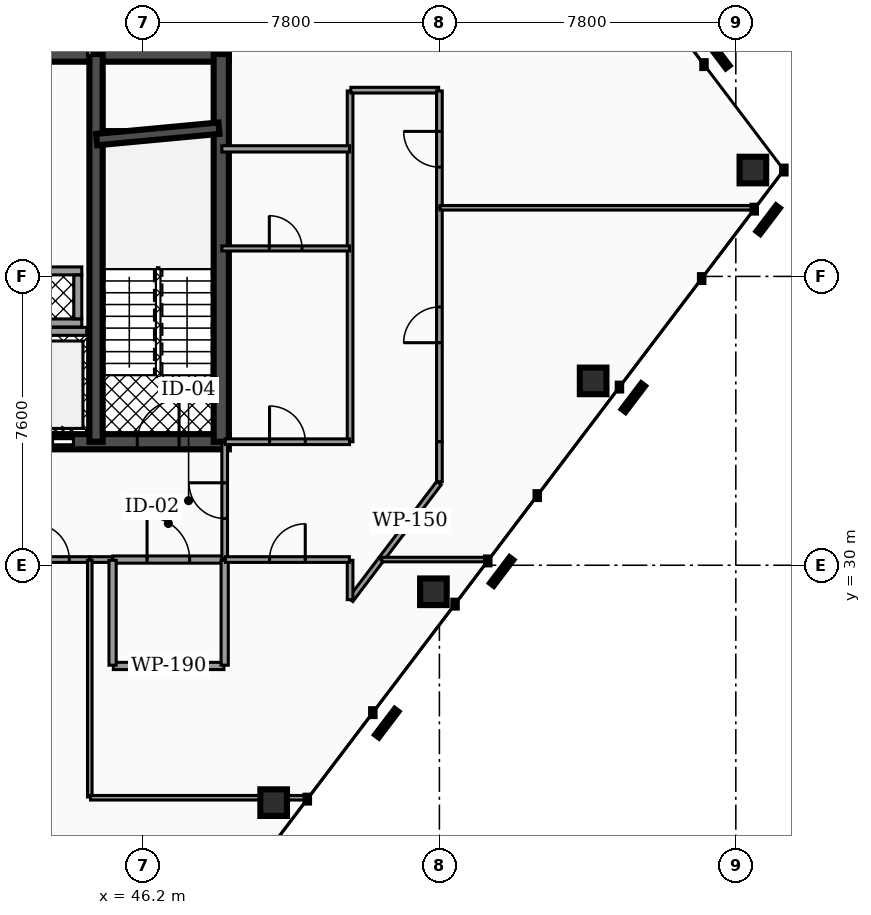
"""IFC4 building model, lengths in metres.
Left out: names, types, materials, properties, quantities, classifications, styles, units other than length and angle.
Written with IfcOpenShell. Run it as: python <this file> out.ifc"""

import sys

from ifc_helpers import new_model, si_unit, direction, frame, frame_2d, origin, origin_2d, place, context, subcontext, project, spatial, rectangle, hollow_rectangle, extrude, element, fill, save


model = new_model("IFC4")
c1 = context("Model", 3, precision=1e-05, world=origin(), true_north=direction((0.0, 1.0)))
c2 = subcontext(c1, "Body", "Model", "MODEL_VIEW")
j1 = project(units=[si_unit("LENGTHUNIT", "METRE"), si_unit("PLANEANGLEUNIT", "RADIAN")], contexts=[c1])
p1 = place(None, origin())
s1 = spatial("IfcSite", under=j1, at=p1, CompositionType="ELEMENT")
p2 = place(p1, origin())
s2 = spatial("IfcBuilding", under=s1, at=p2, CompositionType="ELEMENT")
p3 = place(p2, frame((0.0, 0.0, 175.78)))
s3 = spatial("IfcBuildingStorey", under=s2, at=p3, CompositionType="ELEMENT", Elevation=175.78)
p4 = place(p3, frame((28.4, 43.45, 0.0), z_axis=(0.0, 0.0, 1.0), x_axis=(1.0, 0.0, 0.0)))
e1 = element("IfcWall", 1, at=p4, inside=s3, PredefinedType="SHEAR", context=c2, shape_type="SweptSolid", body=[
    extrude(rectangle(XDim=20.06, YDim=0.4, at=frame_2d((10.03, 0.0))), origin(), (0.0, 0.0, 1.0), 3.5),
])
p5 = place(p3, frame((28.4, 33.25, 0.0), z_axis=(0.0, 0.0, 1.0), x_axis=(1.0, 0.0, 0.0)))
e2 = element("IfcWall", 2, at=p5, inside=s3, PredefinedType="SHEAR", context=c2, shape_type="SweptSolid", body=[
    extrude(rectangle(XDim=20.06, YDim=0.4, at=frame_2d((10.03, 0.0))), origin(), (0.0, 0.0, 1.0), 3.5),
])
p6 = place(p5, frame((4.03, 0.0, 0.0)))
e3 = element("IfcOpeningElement", 3, at=p6, cuts=e2, PredefinedType="OPENING", context=c2, shape_type="SweptSolid", body=[
    extrude(rectangle(XDim=1.1, YDim=2.15, at=frame_2d((0.55, 1.075))), frame((0.0, 0.21, 0.0), z_axis=(0.0, -1.0, 0.0), x_axis=(1.0, 0.0, 0.0)), (0.0, 0.0, 1.0), 0.42),
])
p7 = place(p5, frame((14.87, 0.0, 0.0)))
e4 = element("IfcOpeningElement", 4, at=p7, cuts=e2, PredefinedType="OPENING", context=c2, shape_type="SweptSolid", body=[
    extrude(rectangle(XDim=1.1, YDim=2.15, at=frame_2d((0.55, 1.075))), frame((0.0, 0.21, 0.0), z_axis=(0.0, -1.0, 0.0), x_axis=(1.0, 0.0, 0.0)), (0.0, 0.0, 1.0), 0.42),
])
p8 = place(p5, frame((5.95, 0.0, 0.0)))
e5 = element("IfcOpeningElement", 5, at=p8, cuts=e2, PredefinedType="OPENING", context=c2, shape_type="SweptSolid", body=[
    extrude(rectangle(XDim=1.0, YDim=2.1, at=frame_2d((0.5, 1.05))), frame((0.0, 0.21, 0.0), z_axis=(0.0, -1.0, 0.0), x_axis=(1.0, 0.0, 0.0)), (0.0, 0.0, 1.0), 0.42),
])
p9 = place(p5, frame((7.65, 0.0, 0.0)))
e6 = element("IfcOpeningElement", 6, at=p9, cuts=e2, PredefinedType="OPENING", context=c2, shape_type="SweptSolid", body=[
    extrude(rectangle(XDim=1.0, YDim=2.1, at=frame_2d((0.5, 1.05))), frame((0.0, 0.21, 0.0), z_axis=(0.0, -1.0, 0.0), x_axis=(1.0, 0.0, 0.0)), (0.0, 0.0, 1.0), 0.42),
])
p10 = place(p5, frame((1.31, 0.0, 0.0)))
e7 = element("IfcOpeningElement", 7, at=p10, cuts=e2, PredefinedType="OPENING", context=c2, shape_type="SweptSolid", body=[
    extrude(rectangle(XDim=1.1, YDim=2.2, at=frame_2d((0.55, 1.1))), frame((0.0, 0.21, 0.0), z_axis=(0.0, -1.0, 0.0), x_axis=(1.0, 0.0, 0.0)), (0.0, 0.0, 1.0), 0.42),
])
p11 = place(p5, frame((9.44, 0.0, 0.0)))
e8 = element("IfcOpeningElement", 8, at=p11, cuts=e2, PredefinedType="OPENING", context=c2, shape_type="SweptSolid", body=[
    extrude(rectangle(XDim=1.12, YDim=2.05, at=frame_2d((0.56, 1.025))), frame((0.0, 0.21, 0.0), z_axis=(0.0, -1.0, 0.0), x_axis=(1.0, 0.0, 0.0)), (0.0, 0.0, 1.0), 0.42),
])
p12 = place(p5, frame((17.65, 0.0, 0.0)))
e9 = element("IfcOpeningElement", 9, at=p12, cuts=e2, PredefinedType="OPENING", context=c2, shape_type="SweptSolid", body=[
    extrude(rectangle(XDim=1.1, YDim=2.2, at=frame_2d((0.55, 1.1))), frame((0.0, 0.21, 0.0), z_axis=(0.0, -1.0, 0.0), x_axis=(1.0, 0.0, 0.0)), (0.0, 0.0, 1.0), 0.42),
])
p13 = place(p3, frame((44.965, 33.25, 0.0), z_axis=(0.0, 0.0, 1.0), x_axis=(0.0, 1.0, 0.0)))
e10 = element("IfcWall", 10, at=p13, inside=s3, PredefinedType="SHEAR", context=c2, shape_type="SweptSolid", body=[
    extrude(rectangle(XDim=10.2, YDim=0.35, at=frame_2d((5.1, 0.0))), origin(), (0.0, 0.0, 1.0), 3.5),
])
p14 = place(p3, frame((48.26, 33.25, 0.0), z_axis=(0.0, 0.0, 1.0), x_axis=(0.0, 1.0, 0.0)))
e11 = element("IfcWall", 11, at=p14, inside=s3, PredefinedType="SHEAR", context=c2, shape_type="SweptSolid", body=[
    extrude(rectangle(XDim=10.2, YDim=0.4, at=frame_2d((5.1, 0.0))), origin(), (0.0, 0.0, 1.0), 3.5),
])
p15 = place(p3, frame((44.98, 41.2, 0.0), z_axis=(0.0, 0.0, 1.0), x_axis=(0.995686468965, 0.09278176286, 0.0)))
e12 = element("IfcWall", 12, at=p15, inside=s3, PredefinedType="SHEAR", context=c2, shape_type="SweptSolid", body=[
    extrude(rectangle(XDim=3.234, YDim=0.3, at=frame_2d((1.617, 0.0))), origin(), (0.0, 0.0, 1.0), 3.5),
])
for number, where, z_axis, x_axis in (
    (13, (49.639, 23.754, 0.0), (0.0, 0.0, 1.0), (1.0, 0.0, 0.0)),
    (14, (53.842, 29.302, 0.0), (0.0, 0.0, 1.0), (1.0, 0.0, 0.0)),
    (15, (58.045, 34.851, 0.0), (0.0, 0.0, 1.0), (1.0, 0.0, 0.0)),
    (16, (62.249, 40.399, 0.0), (0.0, 0.0, 1.0), (1.0, 0.0, 0.0)),
):
    element("IfcColumn", number, at=place(p3, frame(where, z_axis=z_axis, x_axis=x_axis)), inside=s3, PredefinedType="COLUMN", context=c2, shape_type="SweptSolid", body=[
        extrude(hollow_rectangle(XDim=0.7, YDim=0.7, WallThickness=0.035, at=origin_2d()), origin(), (0.0, 0.0, 1.0), 3.5),
    ])
p16 = place(p3, frame((42.92, 36.155, 0.0), z_axis=(0.0, 0.0, 1.0), x_axis=(1.0, 0.0, 0.0)))
e17 = element("IfcWall", 17, at=p16, inside=s3, PredefinedType="SOLIDWALL", context=c2, shape_type="SweptSolid", body=[
    extrude(rectangle(XDim=1.8, YDim=0.21, at=frame_2d((0.9, 0.0))), origin(), (0.0, 0.0, 1.0), 2.472),
])
for number, where, z_axis, x_axis in (
    (18, (42.99, 36.375, 0.0), (0.0, 0.0, 1.0), (1.0, 0.0, 0.0)),
    (19, (42.99, 37.745, 0.0), (0.0, 0.0, 1.0), (1.0, 0.0, 0.0)),
):
    element("IfcWall", number, at=place(p3, frame(where, z_axis=z_axis, x_axis=x_axis)), inside=s3, PredefinedType="SOLIDWALL", context=c2, shape_type="SweptSolid", body=[
        extrude(rectangle(XDim=1.6, YDim=0.21, at=frame_2d((0.8, 0.0))), origin(), (0.0, 0.0, 1.0), 3.5),
    ])
p17 = place(p3, frame((44.485, 36.485, 0.0), z_axis=(0.0, 0.0, 1.0), x_axis=(0.0, 1.0, 0.0)))
e20 = element("IfcWall", 20, at=p17, inside=s3, PredefinedType="SOLIDWALL", context=c2, shape_type="SweptSolid", body=[
    extrude(rectangle(XDim=1.15, YDim=0.21, at=frame_2d((0.575, 0.0))), origin(), (0.0, 0.0, 1.0), 3.5),
])
p18 = place(p3, frame((45.405, 30.15, 0.0), z_axis=(0.0, 0.0, 1.0), x_axis=(1.0, 0.0, 0.0)))
e21 = element("IfcWall", 21, at=p18, inside=s3, PredefinedType="PARTITIONING", context=c2, shape_type="SweptSolid", body=[
    extrude(rectangle(XDim=2.925, YDim=0.19, at=frame_2d((1.462, 0.0))), origin(), (0.0, 0.0, 1.0), 2.457),
])
p19 = place(p18, frame((0.903, 0.0, 0.0)))
e22 = element("IfcOpeningElement", 22, at=p19, cuts=e21, PredefinedType="OPENING", context=c2, shape_type="SweptSolid", body=[
    extrude(rectangle(XDim=1.12, YDim=2.05, at=frame_2d((0.56, 1.025))), frame((0.0, 0.105, 0.0), z_axis=(0.0, -1.0, 0.0), x_axis=(1.0, 0.0, 0.0)), (0.0, 0.0, 1.0), 0.21),
])
p20 = place(p3, frame((48.35, 30.17, 0.0), z_axis=(0.0, 0.0, 1.0), x_axis=(0.0, 1.0, 0.0)))
e23 = element("IfcWall", 23, at=p20, inside=s3, PredefinedType="PARTITIONING", context=c2, shape_type="SweptSolid", body=[
    extrude(rectangle(XDim=3.06, YDim=0.15, at=frame_2d((1.53, 0.0))), origin(), (0.0, 0.0, 1.0), 2.457),
])
p21 = place(p20, frame((1.06, 0.0, 0.0)))
e24 = element("IfcOpeningElement", 24, at=p21, cuts=e23, PredefinedType="OPENING", context=c2, shape_type="SweptSolid", body=[
    extrude(rectangle(XDim=0.94, YDim=2.05, at=frame_2d((0.47, 1.025))), frame((0.0, 0.085, 0.0), z_axis=(0.0, -1.0, 0.0), x_axis=(1.0, 0.0, 0.0)), (0.0, 0.0, 1.0), 0.17),
])
p22 = place(p3, frame((35.985, 30.15, 0.0), z_axis=(0.0, 0.0, 1.0), x_axis=(1.0, 0.0, 0.0)))
e25 = element("IfcWall", 25, at=p22, inside=s3, PredefinedType="PARTITIONING", context=c2, shape_type="SweptSolid", body=[
    extrude(rectangle(XDim=8.81, YDim=0.15, at=frame_2d((4.405, 0.0))), origin(), (0.0, 0.0, 1.0), 2.457),
])
p23 = place(p22, frame((7.335, 0.0, 0.0)))
e26 = element("IfcOpeningElement", 26, at=p23, cuts=e25, PredefinedType="OPENING", context=c2, shape_type="SweptSolid", body=[
    extrude(rectangle(XDim=0.94, YDim=2.05, at=frame_2d((0.47, 1.025))), frame((0.0, 0.085, 0.0), z_axis=(0.0, -1.0, 0.0), x_axis=(1.0, 0.0, 0.0)), (0.0, 0.0, 1.0), 0.17),
])
p24 = place(p3, frame((44.805, 30.15, 0.0), z_axis=(0.0, 0.0, 1.0), x_axis=(1.0, 0.0, 0.0)))
e27 = element("IfcWall", 27, at=p24, inside=s3, PredefinedType="PARTITIONING", context=c2, shape_type="SweptSolid", body=[
    extrude(rectangle(XDim=0.59, YDim=0.15, at=frame_2d((0.295, 0.0))), origin(), (0.0, 0.0, 1.0), 2.457),
])
p25 = place(p3, frame((45.42, 27.35, 0.0), z_axis=(0.0, 0.0, 1.0), x_axis=(1.0, 0.0, 0.0)))
e28 = element("IfcWall", 28, at=p25, inside=s3, PredefinedType="PARTITIONING", context=c2, shape_type="SweptSolid", body=[
    extrude(rectangle(XDim=2.91, YDim=0.19, at=frame_2d((1.455, 0.0))), origin(), (0.0, 0.0, 1.0), 2.457),
])
for number, where, z_axis, x_axis in (
    (29, (45.4, 27.37, 0.0), (0.0, 0.0, 1.0), (0.0, 1.0, 0.0)),
    (30, (48.35, 27.37, 0.0), (0.0, 0.0, 1.0), (0.0, 1.0, 0.0)),
):
    element("IfcWall", number, at=place(p3, frame(where, z_axis=z_axis, x_axis=x_axis)), inside=s3, PredefinedType="PARTITIONING", context=c2, shape_type="SweptSolid", body=[
        extrude(rectangle(XDim=2.76, YDim=0.19, at=frame_2d((1.38, 0.0))), origin(), (0.0, 0.0, 1.0), 2.457),
    ])
p26 = place(p3, frame((51.662, 29.091, 0.0), z_axis=(0.0, 0.0, 1.0), x_axis=(0.603847067363, 0.797100193976, 0.0)))
e31 = element("IfcWall", 31, at=p26, inside=s3, PredefinedType="PARTITIONING", context=c2, shape_type="SweptSolid", body=[
    extrude(rectangle(XDim=1.328, YDim=0.15, at=frame_2d((0.664, 0.0))), origin(), (0.0, 0.0, 1.0), 2.457),
])
p27 = place(p3, frame((51.65, 29.095, 0.0), z_axis=(0.0, 0.0, 1.0), x_axis=(0.0, 1.0, 0.0)))
e32 = element("IfcWall", 32, at=p27, inside=s3, PredefinedType="PARTITIONING", context=c2, shape_type="SweptSolid", body=[
    extrude(rectangle(XDim=1.035, YDim=0.15, at=frame_2d((0.518, 0.0))), origin(), (0.0, 0.0, 1.0), 2.457),
])
p28 = place(p3, frame((48.37, 30.15, 0.0), z_axis=(0.0, 0.0, 1.0), x_axis=(1.0, 0.0, 0.0)))
e33 = element("IfcWall", 33, at=p28, inside=s3, PredefinedType="PARTITIONING", context=c2, shape_type="SweptSolid", body=[
    extrude(rectangle(XDim=3.26, YDim=0.15, at=frame_2d((1.63, 0.0))), origin(), (0.0, 0.0, 1.0), 2.457),
])
p29 = place(p28, frame((1.16, 0.0, 0.0)))
e34 = element("IfcOpeningElement", 34, at=p29, cuts=e33, PredefinedType="OPENING", context=c2, shape_type="SweptSolid", body=[
    extrude(rectangle(XDim=0.94, YDim=2.05, at=frame_2d((0.47, 1.025))), frame((0.0, 0.085, 0.0), z_axis=(0.0, -1.0, 0.0), x_axis=(1.0, 0.0, 0.0)), (0.0, 0.0, 1.0), 0.17),
])
p30 = place(p3, frame((54.0, 33.25, 0.0), z_axis=(0.0, 0.0, 1.0), x_axis=(0.0, 1.0, 0.0)))
e35 = element("IfcWall", 35, at=p30, inside=s3, PredefinedType="PARTITIONING", context=c2, shape_type="SweptSolid", body=[
    extrude(rectangle(XDim=6.151, YDim=0.15, at=frame_2d((3.076, 0.0))), origin(), (0.0, 0.0, 1.0), 2.457),
])
p31 = place(p30, frame((2.606, 0.0, 0.0)))
e36 = element("IfcOpeningElement", 36, at=p31, cuts=e35, PredefinedType="OPENING", context=c2, shape_type="SweptSolid", body=[
    extrude(rectangle(XDim=0.94, YDim=2.05, at=frame_2d((0.47, 1.025))), frame((0.0, 0.085, 0.0), z_axis=(0.0, -1.0, 0.0), x_axis=(1.0, 0.0, 0.0)), (0.0, 0.0, 1.0), 0.17),
])
p32 = place(p3, frame((54.0, 32.197, 0.0), z_axis=(0.0, 0.0, 1.0), x_axis=(0.0, 1.0, 0.0)))
e37 = element("IfcWall", 37, at=p32, inside=s3, PredefinedType="PARTITIONING", context=c2, shape_type="SweptSolid", body=[
    extrude(rectangle(XDim=1.053, YDim=0.15, at=frame_2d((0.527, 0.0))), origin(), (0.0, 0.0, 1.0), 2.457),
])
p33 = place(p3, frame((52.468, 30.154, 0.0), z_axis=(0.0, 0.0, 1.0), x_axis=(0.603840884766, 0.797104877594, 0.0)))
e38 = element("IfcWall", 38, at=p33, inside=s3, PredefinedType="PARTITIONING", context=c2, shape_type="SweptSolid", body=[
    extrude(rectangle(XDim=2.518, YDim=0.15, at=frame_2d((1.259, 0.0))), origin(), (0.0, 0.0, 1.0), 2.457),
])
p34 = place(p3, frame((51.65, 33.25, 0.0), z_axis=(0.0, 0.0, 1.0), x_axis=(0.0, 1.0, 0.0)))
e39 = element("IfcWall", 39, at=p34, inside=s3, PredefinedType="PARTITIONING", context=c2, shape_type="SweptSolid", body=[
    extrude(rectangle(XDim=9.23, YDim=0.15, at=frame_2d((4.615, 0.0))), origin(), (0.0, 0.0, 1.0), 2.457),
])
p35 = place(p3, frame((51.67, 42.5, 0.0), z_axis=(0.0, 0.0, 1.0), x_axis=(1.0, 0.0, 0.0)))
e40 = element("IfcWall", 40, at=p35, inside=s3, PredefinedType="PARTITIONING", context=c2, shape_type="SweptSolid", body=[
    extrude(rectangle(XDim=2.31, YDim=0.15, at=frame_2d((1.155, 0.0))), origin(), (0.0, 0.0, 1.0), 2.457),
])
p36 = place(p3, frame((54.0, 39.411, 0.0), z_axis=(0.0, 0.0, 1.0), x_axis=(0.0, 1.0, 0.0)))
e41 = element("IfcWall", 41, at=p36, inside=s3, PredefinedType="PARTITIONING", context=c2, shape_type="SweptSolid", body=[
    extrude(rectangle(XDim=3.069, YDim=0.15, at=frame_2d((1.534, 0.0))), origin(), (0.0, 0.0, 1.0), 2.457),
])
p37 = place(p36, frame((1.064, 0.0, 0.0)))
e42 = element("IfcOpeningElement", 42, at=p37, cuts=e41, PredefinedType="OPENING", context=c2, shape_type="SweptSolid", body=[
    extrude(rectangle(XDim=0.94, YDim=2.05, at=frame_2d((0.47, 1.025))), frame((0.0, 0.085, 0.0), z_axis=(0.0, -1.0, 0.0), x_axis=(1.0, 0.0, 0.0)), (0.0, 0.0, 1.0), 0.17),
])
p38 = place(p3, frame((48.365, 33.25, 0.0), z_axis=(0.0, 0.0, 1.0), x_axis=(1.0, 0.0, 0.0)))
e43 = element("IfcWall", 43, at=p38, inside=s3, PredefinedType="PARTITIONING", context=c2, shape_type="SweptSolid", body=[
    extrude(rectangle(XDim=3.27, YDim=0.15, at=frame_2d((1.635, 0.0))), origin(), (0.0, 0.0, 1.0), 2.457),
])
p39 = place(p38, frame((1.165, 0.0, 0.0)))
e44 = element("IfcOpeningElement", 44, at=p39, cuts=e43, PredefinedType="OPENING", context=c2, shape_type="SweptSolid", body=[
    extrude(rectangle(XDim=0.94, YDim=2.05, at=frame_2d((0.47, 1.025))), frame((0.0, 0.085, 0.0), z_axis=(0.0, -1.0, 0.0), x_axis=(1.0, 0.0, 0.0)), (0.0, 0.0, 1.0), 0.17),
])
p40 = place(p3, frame((44.8, 23.903, 0.0), z_axis=(0.0, 0.0, 1.0), x_axis=(0.0, 1.0, 0.0)))
e45 = element("IfcWall", 45, at=p40, inside=s3, PredefinedType="PARTITIONING", context=c2, shape_type="SweptSolid", body=[
    extrude(rectangle(XDim=6.227, YDim=0.12, at=frame_2d((3.114, 0.0))), origin(), (0.0, 0.0, 1.0), 2.457),
])
p41 = place(p3, frame((44.82, 23.883, 0.0), z_axis=(0.0, 0.0, 1.0), x_axis=(1.0, 0.0, 0.0)))
e46 = element("IfcWall", 46, at=p41, inside=s3, PredefinedType="PARTITIONING", context=c2, shape_type="SweptSolid", body=[
    extrude(rectangle(XDim=5.717, YDim=0.12, at=frame_2d((2.858, 0.0))), origin(), (0.0, 0.0, 1.0), 2.457),
])
p42 = place(p3, frame((44.8, 43.415, 0.0), z_axis=(0.0, 0.0, 1.0), x_axis=(0.0, 1.0, 0.0)))
e47 = element("IfcWall", 47, at=p42, inside=s3, PredefinedType="PARTITIONING", context=c2, shape_type="SweptSolid", body=[
    extrude(rectangle(XDim=3.092, YDim=0.12, at=frame_2d((1.546, 0.0))), origin(), (0.0, 0.0, 1.0), 2.457),
])
p43 = place(p3, frame((52.485, 30.15, 0.0), z_axis=(0.0, 0.0, 1.0), x_axis=(1.0, 0.0, 0.0)))
e48 = element("IfcWall", 48, at=p43, inside=s3, PredefinedType="PARTITIONING", context=c2, shape_type="SweptSolid", body=[
    extrude(rectangle(XDim=2.8, YDim=0.12, at=frame_2d((1.4, 0.0))), origin(), (0.0, 0.0, 1.0), 2.457),
])
p44 = place(p3, frame((54.02, 39.406, 0.0), z_axis=(0.0, 0.0, 1.0), x_axis=(1.0, 0.0, 0.0)))
e49 = element("IfcWall", 49, at=p44, inside=s3, PredefinedType="PARTITIONING", context=c2, shape_type="SweptSolid", body=[
    extrude(rectangle(XDim=8.277, YDim=0.12, at=frame_2d((4.139, 0.0))), origin(), (0.0, 0.0, 1.0), 2.457),
])
p45 = place(p3, frame((48.275, 40.956, 0.0), z_axis=(0.0, 0.0, 1.0), x_axis=(1.0, 0.0, 0.0)))
e50 = element("IfcWall", 50, at=p45, inside=s3, PredefinedType="PARTITIONING", context=c2, shape_type="SweptSolid", body=[
    extrude(rectangle(XDim=3.36, YDim=0.165, at=frame_2d((1.68, 0.0))), origin(), (0.0, 0.0, 1.0), 2.457),
])
p46 = place(p3, frame((48.275, 38.336, 0.0), z_axis=(0.0, 0.0, 1.0), x_axis=(1.0, 0.0, 0.0)))
e51 = element("IfcWall", 51, at=p46, inside=s3, PredefinedType="PARTITIONING", context=c2, shape_type="SweptSolid", body=[
    extrude(rectangle(XDim=3.36, YDim=0.135, at=frame_2d((1.68, 0.0))), origin(), (0.0, 0.0, 1.0), 2.457),
])
p47 = place(p46, frame((1.25, 0.0, 0.0)))
e52 = element("IfcOpeningElement", 52, at=p47, cuts=e51, PredefinedType="OPENING", context=c2, shape_type="SweptSolid", body=[
    extrude(rectangle(XDim=0.86, YDim=2.05, at=frame_2d((0.43, 1.025))), frame((0.0, 0.077, 0.0), z_axis=(0.0, -1.0, 0.0), x_axis=(1.0, 0.0, 0.0)), (0.0, 0.0, 1.0), 0.155),
])
p48 = place(p7, origin())
e53 = element("IfcDoor", 53, at=p48, inside=s3, OperationType="SLIDING_TO_RIGHT", PredefinedType="DOOR", context=c2, shape_type="SweptSolid", body=[
    extrude(rectangle(XDim=1.1, YDim=2.15, at=frame_2d((0.55, 1.075))), frame((0.0, 0.025, 0.0), z_axis=(0.0, -1.0, 0.0), x_axis=(1.0, 0.0, 0.0)), (0.0, 0.0, 1.0), 0.05),
])
fill(e4, e53)
p49 = place(p12, origin())
e54 = element("IfcDoor", 54, at=p49, inside=s3, OperationType="SINGLE_SWING_RIGHT", PredefinedType="DOOR", context=c2, shape_type="SweptSolid", body=[
    extrude(rectangle(XDim=1.1, YDim=2.2, at=frame_2d((0.55, 1.1))), frame((0.0, 0.025, 0.0), z_axis=(0.0, -1.0, 0.0), x_axis=(1.0, 0.0, 0.0)), (0.0, 0.0, 1.0), 0.05),
])
fill(e9, e54)
p50 = place(p19, origin())
e55 = element("IfcDoor", 55, at=p50, inside=s3, OperationType="SINGLE_SWING_LEFT", PredefinedType="DOOR", context=c2, shape_type="SweptSolid", body=[
    extrude(rectangle(XDim=1.12, YDim=2.05, at=frame_2d((0.56, 1.025))), frame((0.0, 0.025, 0.0), z_axis=(0.0, -1.0, 0.0), x_axis=(1.0, 0.0, 0.0)), (0.0, 0.0, 1.0), 0.05),
])
fill(e22, e55)
p51 = place(p21, origin())
e56 = element("IfcDoor", 56, at=p51, inside=s3, OperationType="SINGLE_SWING_RIGHT", PredefinedType="DOOR", context=c2, shape_type="SweptSolid", body=[
    extrude(rectangle(XDim=0.94, YDim=2.05, at=frame_2d((0.47, 1.025))), frame((0.0, 0.025, 0.0), z_axis=(0.0, -1.0, 0.0), x_axis=(1.0, 0.0, 0.0)), (0.0, 0.0, 1.0), 0.05),
])
fill(e24, e56)
p52 = place(p23, origin())
e57 = element("IfcDoor", 57, at=p52, inside=s3, OperationType="SINGLE_SWING_LEFT", PredefinedType="DOOR", context=c2, shape_type="SweptSolid", body=[
    extrude(rectangle(XDim=0.94, YDim=2.05, at=frame_2d((0.47, 1.025))), frame((0.0, 0.025, 0.0), z_axis=(0.0, -1.0, 0.0), x_axis=(1.0, 0.0, 0.0)), (0.0, 0.0, 1.0), 0.05),
])
fill(e26, e57)
p53 = place(p29, origin())
e58 = element("IfcDoor", 58, at=p53, inside=s3, OperationType="SINGLE_SWING_RIGHT", PredefinedType="DOOR", context=c2, shape_type="SweptSolid", body=[
    extrude(rectangle(XDim=0.94, YDim=2.05, at=frame_2d((0.47, 1.025))), frame((0.0, 0.025, 0.0), z_axis=(0.0, -1.0, 0.0), x_axis=(1.0, 0.0, 0.0)), (0.0, 0.0, 1.0), 0.05),
])
fill(e34, e58)
p54 = place(p31, origin())
e59 = element("IfcDoor", 59, at=p54, inside=s3, OperationType="SINGLE_SWING_LEFT", PredefinedType="DOOR", context=c2, shape_type="SweptSolid", body=[
    extrude(rectangle(XDim=0.94, YDim=2.05, at=frame_2d((0.47, 1.025))), frame((0.0, 0.025, 0.0), z_axis=(0.0, -1.0, 0.0), x_axis=(1.0, 0.0, 0.0)), (0.0, 0.0, 1.0), 0.05),
])
fill(e36, e59)
p55 = place(p37, origin())
e60 = element("IfcDoor", 60, at=p55, inside=s3, OperationType="SINGLE_SWING_RIGHT", PredefinedType="DOOR", context=c2, shape_type="SweptSolid", body=[
    extrude(rectangle(XDim=0.94, YDim=2.05, at=frame_2d((0.47, 1.025))), frame((0.0, 0.025, 0.0), z_axis=(0.0, -1.0, 0.0), x_axis=(1.0, 0.0, 0.0)), (0.0, 0.0, 1.0), 0.05),
])
fill(e42, e60)
p56 = place(p39, origin())
e61 = element("IfcDoor", 61, at=p56, inside=s3, OperationType="SINGLE_SWING_LEFT", PredefinedType="DOOR", context=c2, shape_type="SweptSolid", body=[
    extrude(rectangle(XDim=0.94, YDim=2.05, at=frame_2d((0.47, 1.025))), frame((0.0, 0.025, 0.0), z_axis=(0.0, -1.0, 0.0), x_axis=(1.0, 0.0, 0.0)), (0.0, 0.0, 1.0), 0.05),
])
fill(e44, e61)
p57 = place(p47, origin())
e62 = element("IfcDoor", 62, at=p57, inside=s3, OperationType="SINGLE_SWING_LEFT", PredefinedType="DOOR", context=c2, shape_type="SweptSolid", body=[
    extrude(rectangle(XDim=0.86, YDim=2.05, at=frame_2d((0.43, 1.025))), frame((0.0, 0.025, 0.0), z_axis=(0.0, -1.0, 0.0), x_axis=(1.0, 0.0, 0.0)), (0.0, 0.0, 1.0), 0.05),
])
fill(e52, e62)
save(model, sys.argv[1])
